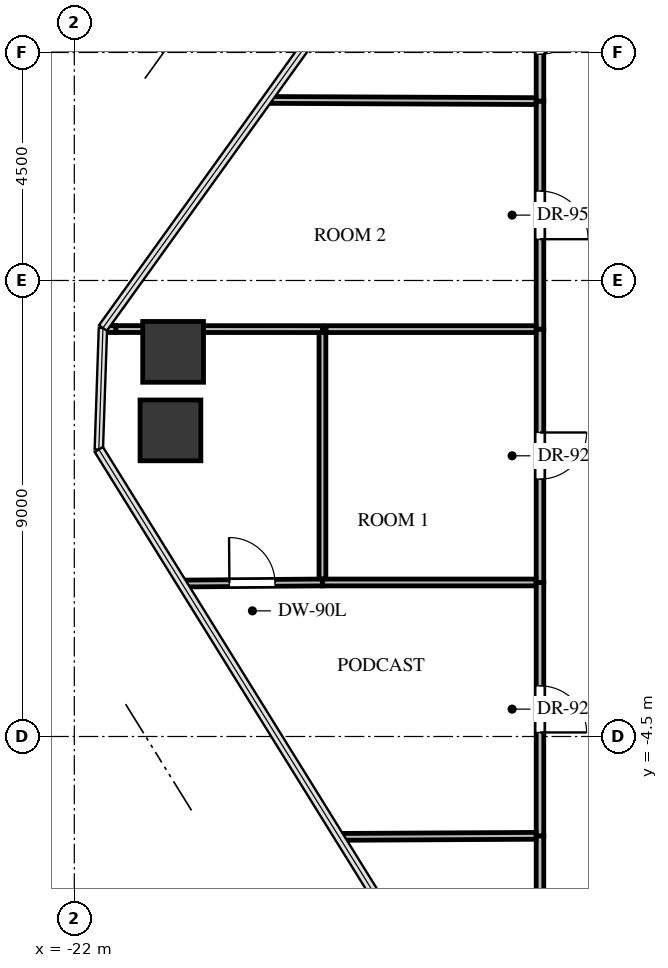
"""IFC4 building model, lengths in metres.
Left out: names, types, materials, properties, quantities, classifications, styles, units other than length and angle.
Written with IfcOpenShell. Run it as: python <this file> out.ifc"""

import sys

from ifc_helpers import new_model, si_unit, direction, frame, frame_2d, origin, origin_2d, place, context, subcontext, project, spatial, rectangle, extrude, source, transform, mapped, element, fill, save


model = new_model("IFC4")
c1 = context("Model", 3, precision=1e-05, world=origin(), true_north=direction((0.0, 1.0)))
c2 = subcontext(c1, "Body", "Model", "MODEL_VIEW")
j1 = project(units=[si_unit("LENGTHUNIT", "METRE"), si_unit("PLANEANGLEUNIT", "RADIAN")], contexts=[c1])
p1 = place(None, origin())
s1 = spatial("IfcSite", under=j1, at=p1, CompositionType="ELEMENT")
p2 = place(p1, origin())
s2 = spatial("IfcBuilding", under=s1, at=p2, CompositionType="ELEMENT")
p3 = place(p2, frame((0.0, 0.0, 130.5)))
s3 = spatial("IfcBuildingStorey", under=s2, at=p3, CompositionType="ELEMENT", Elevation=130.5)
m1 = source(origin(), c2, "Body", "SweptSolid", [
    extrude(rectangle(XDim=1.2, YDim=1.2, at=origin_2d()), origin(), (0.0, 0.0, 1.0), 3.3),
])
for number, where, z_axis, x_axis in (
    (1, (-20.103, 1.542, -0.24), (0.0, 0.0, 1.0), (1.0, 0.0, 0.0)),
    (2, (-20.05, 3.091, -0.24), (0.0, 0.0, 1.0), (1.0, 0.0, 0.0)),
):
    element("IfcColumn", number, at=place(p3, frame(where, z_axis=z_axis, x_axis=x_axis)), inside=s3, PredefinedType="COLUMN", context=c2, shape_type="MappedRepresentation", body=[
        mapped(m1, transform((0.0, 0.0, 0.0), x_axis=(1.0, 0.0, 0.0), y_axis=(0.0, 1.0, 0.0), z_axis=(0.0, 0.0, 1.0), scale=1.0)),
    ])
p4 = place(p3, frame((-12.81, -6.46, 0.0), z_axis=(0.0, 0.0, 1.0), x_axis=(0.0, -1.0, 0.0)))
e3 = element("IfcWall", 3, at=p4, inside=s3, PredefinedType="PARTITIONING", context=c2, shape_type="SweptSolid", body=[
    extrude(rectangle(XDim=4.43, YDim=0.15, at=frame_2d((2.215, 0.0))), origin(), (0.0, 0.0, 1.0), 2.38),
])
p5 = place(p4, frame((1.415, 0.0, 0.0)))
e4 = element("IfcOpeningElement", 4, at=p5, cuts=e3, PredefinedType="OPENING", context=c2, shape_type="SweptSolid", body=[
    extrude(rectangle(XDim=1.6, YDim=2.15, at=frame_2d((0.8, 1.075))), frame((0.0, 0.085, 0.0), z_axis=(0.0, -1.0, 0.0), x_axis=(1.0, 0.0, 0.0)), (0.0, 0.0, 1.0), 0.17),
])
p6 = place(p3, frame((-12.81, -1.46, 0.0), z_axis=(0.0, 0.0, 1.0), x_axis=(0.0, -1.0, 0.0)))
e5 = element("IfcWall", 5, at=p6, inside=s3, PredefinedType="PARTITIONING", context=c2, shape_type="SweptSolid", body=[
    extrude(rectangle(XDim=5.0, YDim=0.15, at=frame_2d((2.5, 0.0))), origin(), (0.0, 0.0, 1.0), 3.045),
])
p7 = place(p6, frame((2.04, 0.0, 0.0)))
e6 = element("IfcOpeningElement", 6, at=p7, cuts=e5, PredefinedType="OPENING", context=c2, shape_type="SweptSolid", body=[
    extrude(rectangle(XDim=0.92, YDim=2.1, at=frame_2d((0.46, 1.05))), frame((0.0, 0.085, 0.0), z_axis=(0.0, -1.0, 0.0), x_axis=(1.0, 0.0, 0.0)), (0.0, 0.0, 1.0), 0.17),
])
p8 = place(p3, frame((-12.81, 3.54, 0.0), z_axis=(0.0, 0.0, 1.0), x_axis=(0.0, -1.0, 0.0)))
e7 = element("IfcWall", 7, at=p8, inside=s3, PredefinedType="PARTITIONING", context=c2, shape_type="SweptSolid", body=[
    extrude(rectangle(XDim=5.0, YDim=0.15, at=frame_2d((2.5, 0.0))), origin(), (0.0, 0.0, 1.0), 2.212),
])
p9 = place(p8, frame((2.04, 0.0, 0.0)))
e8 = element("IfcOpeningElement", 8, at=p9, cuts=e7, PredefinedType="OPENING", context=c2, shape_type="SweptSolid", body=[
    extrude(rectangle(XDim=0.92, YDim=2.1, at=frame_2d((0.46, 1.05))), frame((0.0, 0.085, 0.0), z_axis=(0.0, -1.0, 0.0), x_axis=(1.0, 0.0, 0.0)), (0.0, 0.0, 1.0), 0.17),
])
p10 = place(p3, frame((-12.81, 8.04, 0.0), z_axis=(0.0, 0.0, 1.0), x_axis=(0.0, -1.0, 0.0)))
e9 = element("IfcWall", 9, at=p10, inside=s3, PredefinedType="PARTITIONING", context=c2, shape_type="SweptSolid", body=[
    extrude(rectangle(XDim=4.5, YDim=0.15, at=frame_2d((2.25, 0.0))), origin(), (0.0, 0.0, 1.0), 3.045),
])
p11 = place(p10, frame((1.775, 0.0, 0.0)))
e10 = element("IfcOpeningElement", 10, at=p11, cuts=e9, PredefinedType="OPENING", context=c2, shape_type="SweptSolid", body=[
    extrude(rectangle(XDim=0.95, YDim=2.1, at=frame_2d((0.475, 1.05))), frame((0.0, 0.085, 0.0), z_axis=(0.0, -1.0, 0.0), x_axis=(1.0, 0.0, 0.0)), (0.0, 0.0, 1.0), 0.17),
])
p12 = place(p3, frame((-12.81, 10.81, 0.0), z_axis=(0.0, 0.0, 1.0), x_axis=(0.0, -1.0, 0.0)))
e11 = element("IfcWall", 11, at=p12, inside=s3, PredefinedType="PARTITIONING", context=c2, shape_type="SweptSolid", body=[
    extrude(rectangle(XDim=2.77, YDim=0.15, at=frame_2d((1.385, 0.0))), origin(), (0.0, 0.0, 1.0), 3.045),
])
p13 = place(p12, frame((0.925, 0.0, 0.0)))
e12 = element("IfcOpeningElement", 12, at=p13, cuts=e11, PredefinedType="OPENING", context=c2, shape_type="SweptSolid", body=[
    extrude(rectangle(XDim=0.92, YDim=2.1, at=frame_2d((0.46, 1.05))), frame((0.0, 0.085, 0.0), z_axis=(0.0, -1.0, 0.0), x_axis=(1.0, 0.0, 0.0)), (0.0, 0.0, 1.0), 0.17),
])
p14 = place(p3, frame((-16.774, -6.481, 0.0), z_axis=(0.0, 0.0, 1.0), x_axis=(0.999985736048, 0.005341132812, 0.0)))
e13 = element("IfcWall", 13, at=p14, inside=s3, PredefinedType="PARTITIONING", context=c2, shape_type="SweptSolid", body=[
    extrude(rectangle(XDim=3.885, YDim=0.135, at=frame_2d((1.943, 0.0))), origin(), (0.0, 0.0, 1.0), 2.38),
])
p15 = place(p3, frame((-19.875, -1.481, 0.0), z_axis=(0.0, 0.0, 1.0), x_axis=(0.999970654695, 0.007660923473, 0.0)))
e14 = element("IfcWall", 14, at=p15, inside=s3, PredefinedType="PARTITIONING", context=c2, shape_type="SweptSolid", body=[
    extrude(rectangle(XDim=2.772, YDim=0.135, at=frame_2d((1.386, 0.0))), origin(), (0.0, 0.0, 1.0), 2.38),
])
p16 = place(p15, frame((0.936, 0.0, 0.0)))
e15 = element("IfcOpeningElement", 15, at=p16, cuts=e14, PredefinedType="OPENING", context=c2, shape_type="SweptSolid", body=[
    extrude(rectangle(XDim=0.9, YDim=2.05, at=frame_2d((0.45, 1.025))), frame((0.0, 0.078, 0.0), z_axis=(0.0, -1.0, 0.0), x_axis=(1.0, 0.0, 0.0)), (0.0, 0.0, 1.0), 0.155),
])
p17 = place(p3, frame((-17.103, -1.46, 0.0), z_axis=(0.0, 0.0, 1.0), x_axis=(1.0, 0.0, 0.0)))
e16 = element("IfcWall", 16, at=p17, inside=s3, PredefinedType="PARTITIONING", context=c2, shape_type="SweptSolid", body=[
    extrude(rectangle(XDim=4.214, YDim=0.135, at=frame_2d((2.107, 0.0))), origin(), (0.0, 0.0, 1.0), 3.045),
])
p18 = place(p3, frame((-17.103, 3.54, 0.0), z_axis=(0.0, 0.0, 1.0), x_axis=(0.0, -1.0, 0.0)))
e17 = element("IfcWall", 17, at=p18, inside=s3, PredefinedType="PARTITIONING", context=c2, shape_type="SweptSolid", body=[
    extrude(rectangle(XDim=4.928, YDim=0.135, at=frame_2d((2.464, 0.0))), origin(), (0.0, 0.0, 1.0), 2.212),
])
p19 = place(p3, frame((-21.436, 3.542, 0.0), z_axis=(0.0, 0.0, 1.0), x_axis=(0.999999550774, -0.000947866873, 0.0)))
e18 = element("IfcWall", 18, at=p19, inside=s3, PredefinedType="PARTITIONING", context=c2, shape_type="SweptSolid", body=[
    extrude(rectangle(XDim=0.258, YDim=0.135, at=frame_2d((0.129, 0.0))), origin(), (0.0, 0.0, 1.0), 1.877),
])
p20 = place(p3, frame((-20.175, 3.541, 0.0), z_axis=(0.0, 0.0, 1.0), x_axis=(0.999999949473, -0.0003178892, 0.0)))
e19 = element("IfcWall", 19, at=p20, inside=s3, PredefinedType="PARTITIONING", context=c2, shape_type="SweptSolid", body=[
    extrude(rectangle(XDim=3.072, YDim=0.135, at=frame_2d((1.536, 0.0))), origin(), (0.0, 0.0, 1.0), 1.877),
])
p21 = place(p3, frame((-21.178, 3.541, 0.0), z_axis=(0.0, 0.0, 1.0), x_axis=(0.999999970372, -0.000243427451, 0.0)))
e20 = element("IfcWall", 20, at=p21, inside=s3, PredefinedType="PARTITIONING", context=c2, shape_type="SweptSolid", body=[
    extrude(rectangle(XDim=1.003, YDim=0.135, at=frame_2d((0.501, 0.0))), origin(), (0.0, 0.0, 1.0), 1.877),
])
p22 = place(p3, frame((-17.031, 3.54, 0.0), z_axis=(0.0, 0.0, 1.0), x_axis=(1.0, 0.0, 0.0)))
e21 = element("IfcWall", 21, at=p22, inside=s3, PredefinedType="PARTITIONING", context=c2, shape_type="SweptSolid", body=[
    extrude(rectangle(XDim=4.143, YDim=0.135, at=frame_2d((2.071, 0.0))), origin(), (0.0, 0.0, 1.0), 3.045),
])
p23 = place(p3, frame((-18.202, 8.063, 0.0), z_axis=(0.0, 0.0, 1.0), x_axis=(0.999990671281, -0.004319415637, 0.0)))
e22 = element("IfcWall", 22, at=p23, inside=s3, PredefinedType="PARTITIONING", context=c2, shape_type="SweptSolid", body=[
    extrude(rectangle(XDim=5.313, YDim=0.135, at=frame_2d((2.656, 0.0))), origin(), (0.0, 0.0, 1.0), 2.38),
])
m2 = source(origin(), c2, "Body", "SweptSolid", [
    extrude(rectangle(XDim=0.92, YDim=2.1, at=frame_2d((0.46, 1.05))), frame((0.0, 0.025, 0.0), z_axis=(0.0, -1.0, 0.0), x_axis=(1.0, 0.0, 0.0)), (0.0, 0.0, 1.0), 0.05),
])
p24 = place(p7, origin())
e23 = element("IfcDoor", 23, at=p24, inside=s3, OperationType="SINGLE_SWING_RIGHT", PredefinedType="DOOR", context=c2, shape_type="MappedRepresentation", body=[
    mapped(m2, transform((0.0, 0.0, 0.0), x_axis=(1.0, 0.0, 0.0), y_axis=(0.0, 1.0, 0.0), z_axis=(0.0, 0.0, 1.0), scale=1.0)),
])
fill(e6, e23)
m3 = source(origin(), c2, "Body", "SweptSolid", [
    extrude(rectangle(XDim=0.92, YDim=2.1, at=frame_2d((0.46, 1.05))), frame((0.0, 0.025, 0.0), z_axis=(0.0, -1.0, 0.0), x_axis=(1.0, 0.0, 0.0)), (0.0, 0.0, 1.0), 0.05),
])
p25 = place(p9, origin())
e24 = element("IfcDoor", 24, at=p25, inside=s3, OperationType="SINGLE_SWING_LEFT", PredefinedType="DOOR", context=c2, shape_type="MappedRepresentation", body=[
    mapped(m3, transform((0.0, 0.0, 0.0), x_axis=(1.0, 0.0, 0.0), y_axis=(0.0, 1.0, 0.0), z_axis=(0.0, 0.0, 1.0), scale=1.0)),
])
fill(e8, e24)
m4 = source(origin(), c2, "Body", "SweptSolid", [
    extrude(rectangle(XDim=0.95, YDim=2.1, at=frame_2d((0.475, 1.05))), frame((0.0, 0.025, 0.0), z_axis=(0.0, -1.0, 0.0), x_axis=(1.0, 0.0, 0.0)), (0.0, 0.0, 1.0), 0.05),
])
p26 = place(p11, origin())
e25 = element("IfcDoor", 25, at=p26, inside=s3, OperationType="SINGLE_SWING_RIGHT", PredefinedType="DOOR", context=c2, shape_type="MappedRepresentation", body=[
    mapped(m4, transform((0.0, 0.0, 0.0), x_axis=(1.0, 0.0, 0.0), y_axis=(0.0, 1.0, 0.0), z_axis=(0.0, 0.0, 1.0), scale=1.0)),
])
fill(e10, e25)
p27 = place(p13, origin())
e26 = element("IfcDoor", 26, at=p27, inside=s3, OperationType="SINGLE_SWING_LEFT", PredefinedType="DOOR", context=c2, shape_type="MappedRepresentation", body=[
    mapped(m3, transform((0.0, 0.0, 0.0), x_axis=(1.0, 0.0, 0.0), y_axis=(0.0, 1.0, 0.0), z_axis=(0.0, 0.0, 1.0), scale=1.0)),
])
fill(e12, e26)
m5 = source(origin(), c2, "Body", "SweptSolid", [
    extrude(rectangle(XDim=0.9, YDim=2.05, at=frame_2d((0.45, 1.025))), frame((0.0, 0.025, 0.0), z_axis=(0.0, -1.0, 0.0), x_axis=(1.0, 0.0, 0.0)), (0.0, 0.0, 1.0), 0.05),
])
p28 = place(p16, origin())
e27 = element("IfcDoor", 27, at=p28, inside=s3, OperationType="SINGLE_SWING_LEFT", PredefinedType="DOOR", context=c2, shape_type="MappedRepresentation", body=[
    mapped(m5, transform((0.0, 0.0, 0.0), x_axis=(1.0, 0.0, 0.0), y_axis=(0.0, 1.0, 0.0), z_axis=(0.0, 0.0, 1.0), scale=1.0)),
])
fill(e15, e27)
save(model, sys.argv[1])
